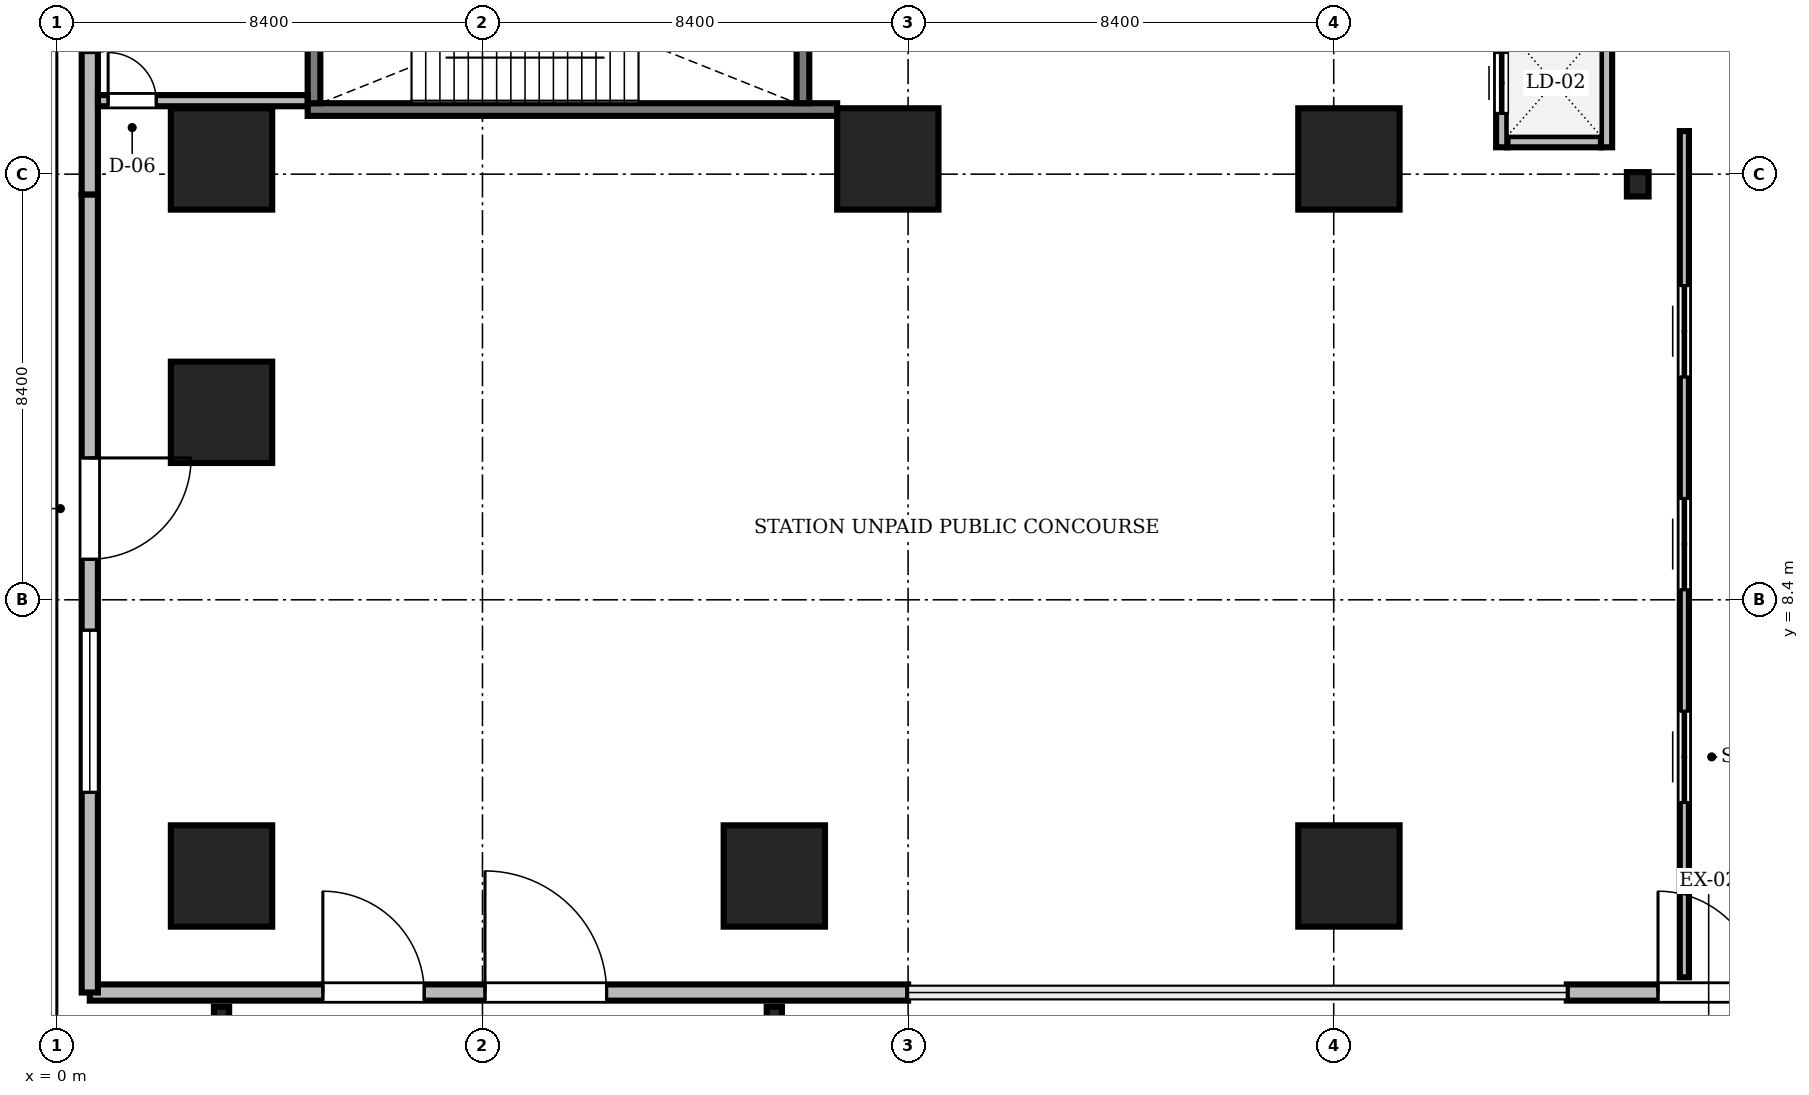
"""IFC4 building model, lengths in metres.
Left out: names, types, materials, properties, quantities, classifications, styles, units other than length and angle.
Written with IfcOpenShell. Run it as: python <this file> out.ifc"""

import sys

from ifc_helpers import new_model, si_unit, direction, frame, frame_2d, origin, origin_2d, place, context, subcontext, project, spatial, rectangle, i_section, extrude, source, transform, mapped, element, fill, save


model = new_model("IFC4")
c1 = context("Model", 3, precision=1e-05, world=origin(), true_north=direction((0.0, 1.0)))
c2 = subcontext(c1, "Body", "Model", "MODEL_VIEW")
j1 = project(units=[si_unit("LENGTHUNIT", "METRE"), si_unit("PLANEANGLEUNIT", "RADIAN")], contexts=[c1])
p1 = place(None, origin())
s1 = spatial("IfcSite", under=j1, at=p1, CompositionType="ELEMENT")
p2 = place(p1, origin())
s2 = spatial("IfcBuilding", under=s1, at=p2, CompositionType="ELEMENT")
p3 = place(p2, origin())
s3 = spatial("IfcBuildingStorey", under=s2, at=p3, CompositionType="ELEMENT", Elevation=0.0)
m1 = source(origin(), c2, "Body", "SweptSolid", [
    extrude(i_section(OverallWidth=0.428, OverallDepth=0.481, WebThickness=0.04, FlangeThickness=0.063, FilletRadius=0.015, at=origin_2d()), origin(), (0.0, 0.0, 1.0), 5.68),
])
p4 = place(p3, frame((31.2, 16.6, 0.0), z_axis=(0.0, 0.0, 1.0), x_axis=(1.0, 0.0, 0.0)))
e1 = element("IfcColumn", 1, at=p4, inside=s3, PredefinedType="COLUMN", context=c2, shape_type="MappedRepresentation", body=[
    mapped(m1, transform((0.0, 0.0, 0.0), scale=1.0)),
])
m2 = source(origin(), c2, "Body", "SweptSolid", [
    extrude(rectangle(XDim=2.0, YDim=2.0, at=origin_2d()), origin(), (0.0, 0.0, 1.0), 5.68),
])
for number, where, z_axis, x_axis in (
    (2, (3.25, 2.95, 0.0), (0.0, 0.0, 1.0), (1.0, 0.0, 0.0)),
    (3, (14.16, 2.95, 0.0), (0.0, 0.0, 1.0), (1.0, 0.0, 0.0)),
    (4, (25.5, 2.95, 0.0), (0.0, 0.0, 1.0), (1.0, 0.0, 0.0)),
    (5, (3.25, 12.1, 0.0), (0.0, 0.0, 1.0), (1.0, 0.0, 0.0)),
    (6, (3.25, 17.1, 0.0), (0.0, 0.0, 1.0), (1.0, 0.0, 0.0)),
    (7, (16.4, 17.1, 0.0), (0.0, 0.0, 1.0), (1.0, 0.0, 0.0)),
    (8, (25.5, 17.1, 0.0), (0.0, 0.0, 1.0), (1.0, 0.0, 0.0)),
):
    element("IfcColumn", number, at=place(p3, frame(where, z_axis=z_axis, x_axis=x_axis)), inside=s3, PredefinedType="COLUMN", context=c2, shape_type="MappedRepresentation", body=[
        mapped(m2, transform((0.0, 0.0, 0.0), scale=1.0)),
    ])
m3 = source(origin(), c2, "Body", "SweptSolid", [
    extrude(rectangle(XDim=16.15, YDim=0.32, at=frame_2d((8.075, 0.0))), origin(), (0.0, 0.0, 1.0), 5.68),
])
p5 = place(p3, frame((0.65, 0.65, 0.0), z_axis=(0.0, 0.0, 1.0), x_axis=(1.0, 0.0, 0.0)))
e9 = element("IfcWall", 9, at=p5, inside=s3, PredefinedType="SOLIDWALL", context=c2, shape_type="MappedRepresentation", body=[
    mapped(m3, transform((0.0, 0.0, 0.0), scale=1.0)),
])
m4 = source(origin(), c2, "Body", "SweptSolid", [
    extrude(rectangle(XDim=2.0, YDim=2.6, at=frame_2d((1.0, 1.3))), frame((0.0, 0.17, 0.0), z_axis=(0.0, -1.0, 0.0), x_axis=(1.0, 0.0, 0.0)), (0.0, 0.0, 1.0), 0.34),
])
p6 = place(p5, frame((4.6, 0.0, 0.0)))
e10 = element("IfcOpeningElement", 10, at=p6, cuts=e9, PredefinedType="OPENING", context=c2, shape_type="MappedRepresentation", body=[
    mapped(m4, transform((0.0, 0.0, 0.0), scale=1.0)),
])
m5 = source(origin(), c2, "Body", "SweptSolid", [
    extrude(rectangle(XDim=2.4, YDim=2.8, at=frame_2d((1.2, 1.4))), frame((0.0, 0.17, 0.0), z_axis=(0.0, -1.0, 0.0), x_axis=(1.0, 0.0, 0.0)), (0.0, 0.0, 1.0), 0.34),
])
p7 = place(p5, frame((7.8, 0.0, 0.0)))
e11 = element("IfcOpeningElement", 11, at=p7, cuts=e9, PredefinedType="OPENING", context=c2, shape_type="MappedRepresentation", body=[
    mapped(m5, transform((0.0, 0.0, 0.0), scale=1.0)),
])
m6 = source(origin(), c2, "Body", "SweptSolid", [
    extrude(rectangle(XDim=18.4, YDim=0.32, at=frame_2d((9.2, 0.0))), origin(), (0.0, 0.0, 1.0), 5.68),
])
p8 = place(p3, frame((29.8, 0.65, 0.0), z_axis=(0.0, 0.0, 1.0), x_axis=(1.0, 0.0, 0.0)))
e12 = element("IfcWall", 12, at=p8, inside=s3, PredefinedType="SOLIDWALL", context=c2, shape_type="MappedRepresentation", body=[
    mapped(m6, transform((0.0, 0.0, 0.0), scale=1.0)),
])
p9 = place(p8, frame((1.8, 0.0, 0.0)))
e13 = element("IfcOpeningElement", 13, at=p9, cuts=e12, PredefinedType="OPENING", context=c2, shape_type="MappedRepresentation", body=[
    mapped(m4, transform((0.0, 0.0, 0.0), scale=1.0)),
])
p10 = place(p8, frame((10.2, 0.0, 0.0)))
e14 = element("IfcOpeningElement", 14, at=p10, cuts=e12, PredefinedType="OPENING", context=c2, shape_type="MappedRepresentation", body=[
    mapped(m5, transform((0.0, 0.0, 0.0), scale=1.0)),
])
m7 = source(origin(), c2, "Body", "SweptSolid", [
    extrude(rectangle(XDim=15.75, YDim=0.32, at=frame_2d((7.875, 0.0))), origin(), (0.0, 0.0, 1.0), 5.68),
])
p11 = place(p3, frame((0.65, 16.4, 0.0), z_axis=(0.0, 0.0, 1.0), x_axis=(0.0, -1.0, 0.0)))
e15 = element("IfcWall", 15, at=p11, inside=s3, PredefinedType="SOLIDWALL", context=c2, shape_type="MappedRepresentation", body=[
    mapped(m7, transform((0.0, 0.0, 0.0), scale=1.0)),
])
p12 = place(p11, frame((5.2, 0.0, 0.0)))
e16 = element("IfcOpeningElement", 16, at=p12, cuts=e15, PredefinedType="OPENING", context=c2, shape_type="MappedRepresentation", body=[
    mapped(m4, transform((0.0, 0.0, 0.0), scale=1.0)),
])
m8 = source(origin(), c2, "Body", "SweptSolid", [
    extrude(rectangle(XDim=3.2, YDim=3.4, at=frame_2d((1.6, 1.7))), frame((0.0, 0.17, 0.0), z_axis=(0.0, -1.0, 0.0), x_axis=(1.0, 0.0, 0.0)), (0.0, 0.0, 1.0), 0.34),
])
p13 = place(p11, frame((8.6, 0.0, 0.85)))
e17 = element("IfcOpeningElement", 17, at=p13, cuts=e15, PredefinedType="OPENING", context=c2, shape_type="MappedRepresentation", body=[
    mapped(m8, transform((0.0, 0.0, 0.0), scale=1.0)),
])
m9 = source(origin(), c2, "Body", "SweptSolid", [
    extrude(rectangle(XDim=6.0, YDim=0.32, at=frame_2d((3.0, 0.0))), origin(), (0.0, 0.0, 1.0), 5.68),
])
p14 = place(p3, frame((0.65, 22.4, 0.0), z_axis=(0.0, 0.0, 1.0), x_axis=(0.0, -1.0, 0.0)))
e18 = element("IfcWall", 18, at=p14, inside=s3, PredefinedType="SOLIDWALL", context=c2, shape_type="MappedRepresentation", body=[
    mapped(m9, transform((0.0, 0.0, 0.0), scale=1.0)),
])
p15 = place(p14, frame((1.2, 0.0, 0.0)))
e19 = element("IfcOpeningElement", 19, at=p15, cuts=e18, PredefinedType="OPENING", context=c2, shape_type="MappedRepresentation", body=[
    mapped(m4, transform((0.0, 0.0, 0.0), scale=1.0)),
])
m10 = source(origin(), c2, "Body", "SweptSolid", [
    extrude(i_section(OverallWidth=0.3, OverallDepth=0.5, WebThickness=0.014, FlangeThickness=0.028, FilletRadius=0.027, at=origin_2d()), origin(), (0.0, 0.0, 1.0), 4.65),
])
for number, where, z_axis, x_axis in (
    (20, (3.25, 0.12, 0.0), (0.0, 0.0, 1.0), (1.0, 0.0, 0.0)),
    (21, (14.16, 0.12, 0.0), (0.0, 0.0, 1.0), (1.0, 0.0, 0.0)),
):
    element("IfcColumn", number, at=place(p3, frame(where, z_axis=z_axis, x_axis=x_axis)), inside=s3, PredefinedType="COLUMN", context=c2, shape_type="MappedRepresentation", body=[
        mapped(m10, transform((0.0, 0.0, 0.0), scale=1.0)),
    ])
m11 = source(origin(), c2, "Body", "SweptSolid", [
    extrude(rectangle(XDim=10.45, YDim=0.25, at=frame_2d((5.225, 0.0))), origin(), (0.0, 0.0, 1.0), 5.8),
])
p16 = place(p3, frame((4.95, 18.075, 0.0), z_axis=(0.0, 0.0, 1.0), x_axis=(1.0, 0.0, 0.0)))
e22 = element("IfcWall", 22, at=p16, inside=s3, PredefinedType="SOLIDWALL", context=c2, shape_type="MappedRepresentation", body=[
    mapped(m11, transform((0.0, 0.0, 0.0), scale=1.0)),
])
m12 = source(origin(), c2, "Body", "SweptSolid", [
    extrude(rectangle(XDim=3.75, YDim=0.25, at=frame_2d((1.875, 0.0))), origin(), (0.0, 0.0, 1.0), 5.8),
])
p17 = place(p3, frame((14.725, 18.2, 0.0), z_axis=(0.0, 0.0, 1.0), x_axis=(0.0, 1.0, 0.0)))
e23 = element("IfcWall", 23, at=p17, inside=s3, PredefinedType="SOLIDWALL", context=c2, shape_type="MappedRepresentation", body=[
    mapped(m12, transform((0.0, 0.0, 0.0), scale=1.0)),
])
p18 = place(p3, frame((5.075, 18.2, 0.0), z_axis=(0.0, 0.0, 1.0), x_axis=(0.0, 1.0, 0.0)))
e24 = element("IfcWall", 24, at=p18, inside=s3, PredefinedType="SOLIDWALL", context=c2, shape_type="MappedRepresentation", body=[
    mapped(m12, transform((0.0, 0.0, 0.0), scale=1.0)),
])
m13 = source(origin(), c2, "Body", "SweptSolid", [
    extrude(rectangle(XDim=1.1, YDim=2.2, at=frame_2d((0.55, 1.1))), frame((0.0, 0.135, 0.0), z_axis=(0.0, -1.0, 0.0), x_axis=(1.0, 0.0, 0.0)), (0.0, 0.0, 1.0), 0.27),
])
p19 = place(p18, frame((2.3, 0.0, 0.0)))
e25 = element("IfcOpeningElement", 25, at=p19, cuts=e24, PredefinedType="OPENING", context=c2, shape_type="MappedRepresentation", body=[
    mapped(m13, transform((0.0, 0.0, 0.0), scale=1.0)),
])
m14 = source(origin(), c2, "Body", "SweptSolid", [
    extrude(rectangle(XDim=1.85, YDim=0.22, at=frame_2d((0.925, 0.0))), origin(), (0.0, 0.0, 1.0), 5.68),
])
p20 = place(p3, frame((28.625, 17.44, 0.0), z_axis=(0.0, 0.0, 1.0), x_axis=(1.0, 0.0, 0.0)))
e26 = element("IfcWall", 26, at=p20, inside=s3, PredefinedType="SOLIDWALL", context=c2, shape_type="MappedRepresentation", body=[
    mapped(m14, transform((0.0, 0.0, 0.0), scale=1.0)),
])
m15 = source(origin(), c2, "Body", "SweptSolid", [
    extrude(rectangle(XDim=2.54, YDim=0.22, at=frame_2d((1.27, 0.0))), origin(), (0.0, 0.0, 1.0), 5.68),
])
p21 = place(p3, frame((28.515, 17.33, 0.0), z_axis=(0.0, 0.0, 1.0), x_axis=(0.0, 1.0, 0.0)))
e27 = element("IfcWall", 27, at=p21, inside=s3, PredefinedType="SOLIDWALL", context=c2, shape_type="MappedRepresentation", body=[
    mapped(m15, transform((0.0, 0.0, 0.0), scale=1.0)),
])
m16 = source(origin(), c2, "Body", "SweptSolid", [
    extrude(rectangle(XDim=1.2, YDim=2.25, at=frame_2d((0.6, 1.125))), frame((0.0, 0.12, 0.0), z_axis=(0.0, -1.0, 0.0), x_axis=(1.0, 0.0, 0.0)), (0.0, 0.0, 1.0), 0.24),
])
p22 = place(p21, frame((0.67, 0.0, 0.0)))
e28 = element("IfcOpeningElement", 28, at=p22, cuts=e27, PredefinedType="OPENING", context=c2, shape_type="MappedRepresentation", body=[
    mapped(m16, transform((0.0, 0.0, 0.0), scale=1.0)),
])
p23 = place(p3, frame((30.585, 17.33, 0.0), z_axis=(0.0, 0.0, 1.0), x_axis=(0.0, 1.0, 0.0)))
e29 = element("IfcWall", 29, at=p23, inside=s3, PredefinedType="SOLIDWALL", context=c2, shape_type="MappedRepresentation", body=[
    mapped(m15, transform((0.0, 0.0, 0.0), scale=1.0)),
])
m17 = source(origin(), c2, "Body", "SweptSolid", [
    extrude(rectangle(XDim=16.7, YDim=0.18, at=frame_2d((8.35, 0.0))), origin(), (0.0, 0.0, 1.0), 5.148),
])
p24 = place(p3, frame((32.12, 0.95, 0.0), z_axis=(0.0, 0.0, 1.0), x_axis=(0.0, 1.0, 0.0)))
e30 = element("IfcWall", 30, at=p24, inside=s3, PredefinedType="PARTITIONING", context=c2, shape_type="MappedRepresentation", body=[
    mapped(m17, transform((0.0, 0.0, 0.0), scale=1.0)),
])
m18 = source(origin(), c2, "Body", "SweptSolid", [
    extrude(rectangle(XDim=1.8, YDim=2.2, at=frame_2d((0.9, 1.1))), frame((0.0, 0.1, 0.0), z_axis=(0.0, -1.0, 0.0), x_axis=(1.0, 0.0, 0.0)), (0.0, 0.0, 1.0), 0.2),
])
p25 = place(p24, frame((3.45, 0.0, 0.0)))
e31 = element("IfcOpeningElement", 31, at=p25, cuts=e30, PredefinedType="OPENING", context=c2, shape_type="MappedRepresentation", body=[
    mapped(m18, transform((0.0, 0.0, 0.0), scale=1.0)),
])
p26 = place(p24, frame((7.65, 0.0, 0.0)))
e32 = element("IfcOpeningElement", 32, at=p26, cuts=e30, PredefinedType="OPENING", context=c2, shape_type="MappedRepresentation", body=[
    mapped(m18, transform((0.0, 0.0, 0.0), scale=1.0)),
])
p27 = place(p24, frame((11.85, 0.0, 0.0)))
e33 = element("IfcOpeningElement", 33, at=p27, cuts=e30, PredefinedType="OPENING", context=c2, shape_type="MappedRepresentation", body=[
    mapped(m18, transform((0.0, 0.0, 0.0), scale=1.0)),
])
m19 = source(origin(), c2, "Body", "SweptSolid", [
    extrude(rectangle(XDim=4.136, YDim=0.22, at=frame_2d((2.068, 0.0))), origin(), (0.0, 0.0, 1.0), 5.072),
])
p28 = place(p3, frame((0.812, 18.25, 0.0), z_axis=(0.0, 0.0, 1.0), x_axis=(1.0, 0.0, 0.0)))
e34 = element("IfcWall", 34, at=p28, inside=s3, PredefinedType="SOLIDWALL", context=c2, shape_type="MappedRepresentation", body=[
    mapped(m19, transform((0.0, 0.0, 0.0), scale=1.0)),
])
m20 = source(origin(), c2, "Body", "SweptSolid", [
    extrude(rectangle(XDim=0.95, YDim=2.15, at=frame_2d((0.475, 1.075))), frame((0.0, 0.12, 0.0), z_axis=(0.0, -1.0, 0.0), x_axis=(1.0, 0.0, 0.0)), (0.0, 0.0, 1.0), 0.24),
])
p29 = place(p28, frame((0.2, 0.0, 0.0)))
e35 = element("IfcOpeningElement", 35, at=p29, cuts=e34, PredefinedType="OPENING", context=c2, shape_type="MappedRepresentation", body=[
    mapped(m20, transform((0.0, 0.0, 0.0), scale=1.0)),
])
m21 = source(origin(), c2, "Body", "SweptSolid", [
    extrude(rectangle(XDim=2.0, YDim=2.6, at=frame_2d((1.0, 1.3))), frame((0.0, 0.025, 0.0), z_axis=(0.0, -1.0, 0.0), x_axis=(1.0, 0.0, 0.0)), (0.0, 0.0, 1.0), 0.05),
])
p30 = place(p6, frame((2.0, 0.0, 0.0), z_axis=(0.0, 0.0, 1.0), x_axis=(-1.0, 0.0, 0.0)))
e36 = element("IfcDoor", 36, at=p30, inside=s3, OperationType="DOUBLE_DOOR_SINGLE_SWING", PredefinedType="DOOR", context=c2, shape_type="MappedRepresentation", body=[
    mapped(m21, transform((0.0, 0.0, 0.0), scale=1.0)),
])
fill(e10, e36)
m22 = source(origin(), c2, "Body", "SweptSolid", [
    extrude(rectangle(XDim=2.4, YDim=2.8, at=frame_2d((1.2, 1.4))), frame((0.0, 0.025, 0.0), z_axis=(0.0, -1.0, 0.0), x_axis=(1.0, 0.0, 0.0)), (0.0, 0.0, 1.0), 0.05),
])
p31 = place(p7, frame((2.4, 0.0, 0.0), z_axis=(0.0, 0.0, 1.0), x_axis=(-1.0, 0.0, 0.0)))
e37 = element("IfcDoor", 37, at=p31, inside=s3, OperationType="DOUBLE_DOOR_SINGLE_SWING", PredefinedType="DOOR", context=c2, shape_type="MappedRepresentation", body=[
    mapped(m22, transform((0.0, 0.0, 0.0), scale=1.0)),
])
fill(e11, e37)
p32 = place(p9, frame((2.0, 0.0, 0.0), z_axis=(0.0, 0.0, 1.0), x_axis=(-1.0, 0.0, 0.0)))
e38 = element("IfcDoor", 38, at=p32, inside=s3, OperationType="DOUBLE_DOOR_SINGLE_SWING", PredefinedType="DOOR", context=c2, shape_type="MappedRepresentation", body=[
    mapped(m21, transform((0.0, 0.0, 0.0), scale=1.0)),
])
fill(e13, e38)
p33 = place(p12, frame((2.0, 0.0, 0.0), z_axis=(0.0, 0.0, 1.0), x_axis=(-1.0, 0.0, 0.0)))
e39 = element("IfcDoor", 39, at=p33, inside=s3, OperationType="DOUBLE_DOOR_SINGLE_SWING", PredefinedType="DOOR", context=c2, shape_type="MappedRepresentation", body=[
    mapped(m21, transform((0.0, 0.0, 0.0), scale=1.0)),
])
fill(e16, e39)
m23 = source(origin(), c2, "Body", "SweptSolid", [
    extrude(rectangle(XDim=3.2, YDim=3.4, at=frame_2d((1.6, 1.7))), frame((0.0, 0.03, 0.0), z_axis=(0.0, -1.0, 0.0), x_axis=(1.0, 0.0, 0.0)), (0.0, 0.0, 1.0), 0.06),
])
p34 = place(p13, origin())
e40 = element("IfcWindow", 40, at=p34, inside=s3, PartitioningType="SINGLE_PANEL", PredefinedType="WINDOW", context=c2, shape_type="MappedRepresentation", body=[
    mapped(m23, transform((0.0, 0.0, 0.0), scale=1.0)),
])
fill(e17, e40)
m24 = source(origin(), c2, "Body", "SweptSolid", [
    extrude(rectangle(XDim=1.2, YDim=2.25, at=frame_2d((0.6, 1.125))), frame((0.0, 0.025, 0.0), z_axis=(0.0, -1.0, 0.0), x_axis=(1.0, 0.0, 0.0)), (0.0, 0.0, 1.0), 0.05),
])
p35 = place(p22, origin())
e41 = element("IfcDoor", 41, at=p35, inside=s3, OperationType="DOUBLE_DOOR_SLIDING", PredefinedType="DOOR", context=c2, shape_type="MappedRepresentation", body=[
    mapped(m24, transform((0.0, 0.0, 0.0), scale=1.0)),
])
fill(e28, e41)
m25 = source(origin(), c2, "Body", "SweptSolid", [
    extrude(rectangle(XDim=1.8, YDim=2.2, at=frame_2d((0.9, 1.1))), frame((0.0, 0.025, 0.0), z_axis=(0.0, -1.0, 0.0), x_axis=(1.0, 0.0, 0.0)), (0.0, 0.0, 1.0), 0.05),
])
p36 = place(p25, origin())
e42 = element("IfcDoor", 42, at=p36, inside=s3, OperationType="DOUBLE_DOOR_SLIDING", PredefinedType="GATE", context=c2, shape_type="MappedRepresentation", body=[
    mapped(m25, transform((0.0, 0.0, 0.0), scale=1.0)),
])
fill(e31, e42)
p37 = place(p26, origin())
e43 = element("IfcDoor", 43, at=p37, inside=s3, OperationType="DOUBLE_DOOR_SLIDING", PredefinedType="GATE", context=c2, shape_type="MappedRepresentation", body=[
    mapped(m25, transform((0.0, 0.0, 0.0), scale=1.0)),
])
fill(e32, e43)
p38 = place(p27, origin())
e44 = element("IfcDoor", 44, at=p38, inside=s3, OperationType="DOUBLE_DOOR_SLIDING", PredefinedType="GATE", context=c2, shape_type="MappedRepresentation", body=[
    mapped(m25, transform((0.0, 0.0, 0.0), scale=1.0)),
])
fill(e33, e44)
m26 = source(origin(), c2, "Body", "SweptSolid", [
    extrude(rectangle(XDim=0.95, YDim=2.15, at=frame_2d((0.475, 1.075))), frame((0.0, 0.025, 0.0), z_axis=(0.0, -1.0, 0.0), x_axis=(1.0, 0.0, 0.0)), (0.0, 0.0, 1.0), 0.05),
])
p39 = place(p29, origin())
e45 = element("IfcDoor", 45, at=p39, inside=s3, OperationType="SINGLE_SWING_LEFT", PredefinedType="DOOR", context=c2, shape_type="MappedRepresentation", body=[
    mapped(m26, transform((0.0, 0.0, 0.0), scale=1.0)),
])
fill(e35, e45)
save(model, sys.argv[1])
